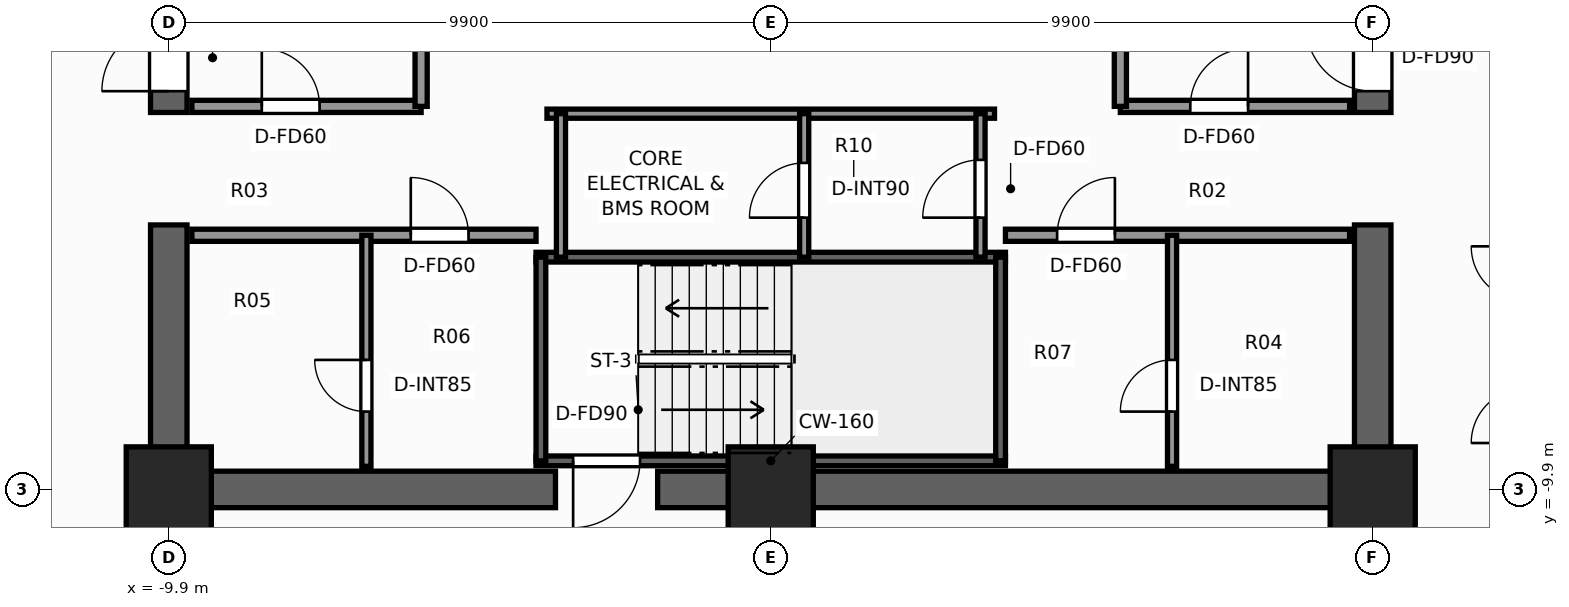
"""IFC4 building model, lengths in metres.
Left out: names, types, materials, properties, quantities, classifications, styles, units other than length and angle.
Written with IfcOpenShell. Run it as: python <this file> out.ifc"""

import sys

from ifc_helpers import new_model, si_unit, direction, frame, frame_2d, origin, origin_2d, place, context, subcontext, project, spatial, rectangle, extrude, element, fill, save


model = new_model("IFC4")
c1 = context("Model", 3, precision=1e-05, world=origin(), true_north=direction((0.0, 1.0)))
c2 = subcontext(c1, "Body", "Model", "MODEL_VIEW")
j1 = project(units=[si_unit("LENGTHUNIT", "METRE"), si_unit("PLANEANGLEUNIT", "RADIAN")], contexts=[c1])
p1 = place(None, origin())
s1 = spatial("IfcSite", under=j1, at=p1, CompositionType="ELEMENT")
p2 = place(p1, origin())
s2 = spatial("IfcBuilding", under=s1, at=p2, CompositionType="ELEMENT")
p3 = place(p2, frame((0.0, 0.0, 33.7)))
s3 = spatial("IfcBuildingStorey", under=s2, at=p3, CompositionType="ELEMENT", Elevation=33.7)
p4 = place(p3, frame((10.2, -9.9, 0.0), z_axis=(0.0, 0.0, 1.0), x_axis=(-1.0, 0.0, 0.0)))
e1 = element("IfcWall", 1, at=p4, inside=s3, PredefinedType="SHEAR", context=c2, shape_type="SweptSolid", body=[
    extrude(rectangle(XDim=12.06, YDim=0.6, at=frame_2d((6.03, 0.0))), origin(), (0.0, 0.0, 1.0), 3.3),
])
p5 = place(p3, frame((-3.54, -9.9, 0.0), z_axis=(0.0, 0.0, 1.0), x_axis=(-1.0, 0.0, 0.0)))
e2 = element("IfcWall", 2, at=p5, inside=s3, PredefinedType="SHEAR", context=c2, shape_type="SweptSolid", body=[
    extrude(rectangle(XDim=6.66, YDim=0.6, at=frame_2d((3.33, 0.0))), origin(), (0.0, 0.0, 1.0), 3.3),
])
for number, where, z_axis, x_axis in (
    (3, (-9.9, -9.6, 0.0), (0.0, 0.0, 1.0), (0.0, 1.0, 0.0)),
    (4, (9.9, -9.6, 0.0), (0.0, 0.0, 1.0), (0.0, 1.0, 0.0)),
):
    element("IfcWall", number, at=place(p3, frame(where, z_axis=z_axis, x_axis=x_axis)), inside=s3, PredefinedType="SHEAR", context=c2, shape_type="SweptSolid", body=[
        extrude(rectangle(XDim=4.05, YDim=0.6, at=frame_2d((2.025, 0.0))), origin(), (0.0, 0.0, 1.0), 3.3),
    ])
p6 = place(p3, frame((-9.9, -3.7, 0.0), z_axis=(0.0, 0.0, 1.0), x_axis=(0.0, 1.0, 0.0)))
e5 = element("IfcWall", 5, at=p6, inside=s3, PredefinedType="SHEAR", context=c2, shape_type="SweptSolid", body=[
    extrude(rectangle(XDim=13.3, YDim=0.6, at=frame_2d((6.65, 0.0))), origin(), (0.0, 0.0, 1.0), 3.3),
])
p7 = place(p6, frame((0.35, 0.0, 0.0)))
e6 = element("IfcOpeningElement", 6, at=p7, cuts=e5, PredefinedType="OPENING", context=c2, shape_type="SweptSolid", body=[
    extrude(rectangle(XDim=1.1, YDim=2.2, at=frame_2d((0.55, 1.1))), frame((0.0, 0.31, 0.0), z_axis=(0.0, -1.0, 0.0), x_axis=(1.0, 0.0, 0.0)), (0.0, 0.0, 1.0), 0.62),
])
p8 = place(p3, frame((9.9, -3.7, 0.0), z_axis=(0.0, 0.0, 1.0), x_axis=(0.0, 1.0, 0.0)))
e7 = element("IfcWall", 7, at=p8, inside=s3, PredefinedType="SHEAR", context=c2, shape_type="SweptSolid", body=[
    extrude(rectangle(XDim=13.3, YDim=0.6, at=frame_2d((6.65, 0.0))), origin(), (0.0, 0.0, 1.0), 3.3),
])
p9 = place(p8, frame((0.35, 0.0, 0.0)))
e8 = element("IfcOpeningElement", 8, at=p9, cuts=e7, PredefinedType="OPENING", context=c2, shape_type="SweptSolid", body=[
    extrude(rectangle(XDim=1.1, YDim=2.2, at=frame_2d((0.55, 1.1))), frame((0.0, 0.31, 0.0), z_axis=(0.0, -1.0, 0.0), x_axis=(1.0, 0.0, 0.0)), (0.0, 0.0, 1.0), 0.62),
])
for number, where, z_axis, x_axis in (
    (9, (-9.9, -9.9, 0.0), (0.0, 0.0, 1.0), (1.0, 0.0, 0.0)),
    (10, (9.9, -9.9, 0.0), (0.0, 0.0, 1.0), (1.0, 0.0, 0.0)),
    (11, (0.0, -9.9, 0.0), (0.0, 0.0, 1.0), (1.0, 0.0, 0.0)),
):
    element("IfcColumn", number, at=place(p3, frame(where, z_axis=z_axis, x_axis=x_axis)), inside=s3, PredefinedType="COLUMN", context=c2, shape_type="SweptSolid", body=[
        extrude(rectangle(XDim=1.4, YDim=1.4, at=origin_2d()), origin(), (0.0, 0.0, 1.0), 3.3),
    ])
p10 = place(p3, frame((3.86, -9.43, 0.0), z_axis=(0.0, 0.0, 1.0), x_axis=(-1.0, 0.0, 0.0)))
e12 = element("IfcWall", 12, at=p10, inside=s3, PredefinedType="SHEAR", context=c2, shape_type="SweptSolid", body=[
    extrude(rectangle(XDim=7.72, YDim=0.16, at=frame_2d((3.86, 0.0))), origin(), (0.0, 0.0, 1.0), 3.3),
])
p11 = place(p10, frame((6.01, 0.0, 0.0)))
e13 = element("IfcOpeningElement", 13, at=p11, cuts=e12, PredefinedType="OPENING", context=c2, shape_type="SweptSolid", body=[
    extrude(rectangle(XDim=1.1, YDim=2.2, at=frame_2d((0.55, 1.1))), frame((0.0, 0.09, 0.0), z_axis=(0.0, -1.0, 0.0), x_axis=(1.0, 0.0, 0.0)), (0.0, 0.0, 1.0), 0.18),
])
p12 = place(p3, frame((-3.86, -6.08, 0.0), z_axis=(0.0, 0.0, 1.0), x_axis=(1.0, 0.0, 0.0)))
e14 = element("IfcWall", 14, at=p12, inside=s3, PredefinedType="SHEAR", context=c2, shape_type="SweptSolid", body=[
    extrude(rectangle(XDim=7.72, YDim=0.16, at=frame_2d((3.86, 0.0))), origin(), (0.0, 0.0, 1.0), 3.3),
])
for number, where, z_axis, x_axis in (
    (15, (-3.78, -9.43, 0.0), (0.0, 0.0, 1.0), (0.0, 1.0, 0.0)),
    (16, (3.78, -9.43, 0.0), (0.0, 0.0, 1.0), (0.0, 1.0, 0.0)),
):
    element("IfcWall", number, at=place(p3, frame(where, z_axis=z_axis, x_axis=x_axis)), inside=s3, PredefinedType="SHEAR", context=c2, shape_type="SweptSolid", body=[
        extrude(rectangle(XDim=3.35, YDim=0.16, at=frame_2d((1.675, 0.0))), origin(), (0.0, 0.0, 1.0), 3.3),
    ])
p13 = place(p3, frame((-9.52, -3.6, 0.0), z_axis=(0.0, 0.0, 1.0), x_axis=(1.0, 0.0, 0.0)))
e17 = element("IfcWall", 17, at=p13, inside=s3, PredefinedType="SOLIDWALL", context=c2, shape_type="SweptSolid", body=[
    extrude(rectangle(XDim=3.77, YDim=0.2, at=frame_2d((1.885, 0.0))), origin(), (0.0, 0.0, 1.0), 3.06),
])
p14 = place(p13, frame((1.15, 0.0, 0.0)))
e18 = element("IfcOpeningElement", 18, at=p14, cuts=e17, PredefinedType="OPENING", context=c2, shape_type="SweptSolid", body=[
    extrude(rectangle(XDim=0.95, YDim=2.06, at=frame_2d((0.475, 1.03))), frame((0.0, 0.11, 0.0), z_axis=(0.0, -1.0, 0.0), x_axis=(1.0, 0.0, 0.0)), (0.0, 0.0, 1.0), 0.22),
])
p15 = place(p3, frame((-5.75, -3.6, 0.0), z_axis=(0.0, 0.0, 1.0), x_axis=(0.0, 1.0, 0.0)))
e19 = element("IfcWall", 19, at=p15, inside=s3, PredefinedType="SOLIDWALL", context=c2, shape_type="SweptSolid", body=[
    extrude(rectangle(XDim=5.57, YDim=0.2, at=frame_2d((2.785, 0.0))), origin(), (0.0, 0.0, 1.0), 3.06),
])
p16 = place(p15, frame((2.75, 0.0, 0.0)))
e20 = element("IfcOpeningElement", 20, at=p16, cuts=e19, PredefinedType="OPENING", context=c2, shape_type="SweptSolid", body=[
    extrude(rectangle(XDim=1.1, YDim=2.2, at=frame_2d((0.55, 1.1))), frame((0.0, 0.11, 0.0), z_axis=(0.0, -1.0, 0.0), x_axis=(1.0, 0.0, 0.0)), (0.0, 0.0, 1.0), 0.22),
])
p17 = place(p3, frame((5.75, -3.6, 0.0), z_axis=(0.0, 0.0, 1.0), x_axis=(1.0, 0.0, 0.0)))
e21 = element("IfcWall", 21, at=p17, inside=s3, PredefinedType="SOLIDWALL", context=c2, shape_type="SweptSolid", body=[
    extrude(rectangle(XDim=3.77, YDim=0.2, at=frame_2d((1.885, 0.0))), origin(), (0.0, 0.0, 1.0), 3.06),
])
p18 = place(p17, frame((1.15, 0.0, 0.0)))
e22 = element("IfcOpeningElement", 22, at=p18, cuts=e21, PredefinedType="OPENING", context=c2, shape_type="SweptSolid", body=[
    extrude(rectangle(XDim=0.95, YDim=2.06, at=frame_2d((0.475, 1.03))), frame((0.0, 0.11, 0.0), z_axis=(0.0, -1.0, 0.0), x_axis=(1.0, 0.0, 0.0)), (0.0, 0.0, 1.0), 0.22),
])
p19 = place(p3, frame((5.75, -3.6, 0.0), z_axis=(0.0, 0.0, 1.0), x_axis=(0.0, 1.0, 0.0)))
e23 = element("IfcWall", 23, at=p19, inside=s3, PredefinedType="SOLIDWALL", context=c2, shape_type="SweptSolid", body=[
    extrude(rectangle(XDim=5.57, YDim=0.2, at=frame_2d((2.785, 0.0))), origin(), (0.0, 0.0, 1.0), 3.06),
])
p20 = place(p19, frame((2.75, 0.0, 0.0)))
e24 = element("IfcOpeningElement", 24, at=p20, cuts=e23, PredefinedType="OPENING", context=c2, shape_type="SweptSolid", body=[
    extrude(rectangle(XDim=1.1, YDim=2.2, at=frame_2d((0.55, 1.1))), frame((0.0, 0.11, 0.0), z_axis=(0.0, -1.0, 0.0), x_axis=(1.0, 0.0, 0.0)), (0.0, 0.0, 1.0), 0.22),
])
p21 = place(p3, frame((-9.52, -5.72, 0.0), z_axis=(0.0, 0.0, 1.0), x_axis=(1.0, 0.0, 0.0)))
e25 = element("IfcWall", 25, at=p21, inside=s3, PredefinedType="SOLIDWALL", context=c2, shape_type="SweptSolid", body=[
    extrude(rectangle(XDim=5.66, YDim=0.2, at=frame_2d((2.83, 0.0))), origin(), (0.0, 0.0, 1.0), 3.06),
])
p22 = place(p21, frame((3.6, 0.0, 0.0)))
e26 = element("IfcOpeningElement", 26, at=p22, cuts=e25, PredefinedType="OPENING", context=c2, shape_type="SweptSolid", body=[
    extrude(rectangle(XDim=0.95, YDim=2.06, at=frame_2d((0.475, 1.03))), frame((0.0, 0.11, 0.0), z_axis=(0.0, -1.0, 0.0), x_axis=(1.0, 0.0, 0.0)), (0.0, 0.0, 1.0), 0.22),
])
p23 = place(p3, frame((-6.65, -9.52, 0.0), z_axis=(0.0, 0.0, 1.0), x_axis=(0.0, 1.0, 0.0)))
e27 = element("IfcWall", 27, at=p23, inside=s3, PredefinedType="PARTITIONING", context=c2, shape_type="SweptSolid", body=[
    extrude(rectangle(XDim=3.8, YDim=0.15, at=frame_2d((1.9, 0.0))), origin(), (0.0, 0.0, 1.0), 3.06),
])
p24 = place(p23, frame((0.9, 0.0, 0.0)))
e28 = element("IfcOpeningElement", 28, at=p24, cuts=e27, PredefinedType="OPENING", context=c2, shape_type="SweptSolid", body=[
    extrude(rectangle(XDim=0.85, YDim=2.03, at=frame_2d((0.425, 1.015))), frame((0.0, 0.085, 0.0), z_axis=(0.0, -1.0, 0.0), x_axis=(1.0, 0.0, 0.0)), (0.0, 0.0, 1.0), 0.17),
])
p25 = place(p3, frame((3.86, -5.72, 0.0), z_axis=(0.0, 0.0, 1.0), x_axis=(1.0, 0.0, 0.0)))
e29 = element("IfcWall", 29, at=p25, inside=s3, PredefinedType="SOLIDWALL", context=c2, shape_type="SweptSolid", body=[
    extrude(rectangle(XDim=5.66, YDim=0.2, at=frame_2d((2.83, 0.0))), origin(), (0.0, 0.0, 1.0), 3.06),
])
p26 = place(p25, frame((0.85, 0.0, 0.0)))
e30 = element("IfcOpeningElement", 30, at=p26, cuts=e29, PredefinedType="OPENING", context=c2, shape_type="SweptSolid", body=[
    extrude(rectangle(XDim=0.95, YDim=2.06, at=frame_2d((0.475, 1.03))), frame((0.0, 0.11, 0.0), z_axis=(0.0, -1.0, 0.0), x_axis=(1.0, 0.0, 0.0)), (0.0, 0.0, 1.0), 0.22),
])
p27 = place(p3, frame((6.6, -9.52, 0.0), z_axis=(0.0, 0.0, 1.0), x_axis=(0.0, 1.0, 0.0)))
e31 = element("IfcWall", 31, at=p27, inside=s3, PredefinedType="PARTITIONING", context=c2, shape_type="SweptSolid", body=[
    extrude(rectangle(XDim=3.8, YDim=0.15, at=frame_2d((1.9, 0.0))), origin(), (0.0, 0.0, 1.0), 3.06),
])
p28 = place(p27, frame((0.9, 0.0, 0.0)))
e32 = element("IfcOpeningElement", 32, at=p28, cuts=e31, PredefinedType="OPENING", context=c2, shape_type="SweptSolid", body=[
    extrude(rectangle(XDim=0.85, YDim=2.03, at=frame_2d((0.425, 1.015))), frame((0.0, 0.085, 0.0), z_axis=(0.0, -1.0, 0.0), x_axis=(1.0, 0.0, 0.0)), (0.0, 0.0, 1.0), 0.17),
])
p29 = place(p3, frame((-3.68, -3.72, 0.0), z_axis=(0.0, 0.0, 1.0), x_axis=(1.0, 0.0, 0.0)))
e33 = element("IfcWall", 33, at=p29, inside=s3, PredefinedType="PARTITIONING", context=c2, shape_type="SweptSolid", body=[
    extrude(rectangle(XDim=7.36, YDim=0.15, at=frame_2d((3.68, 0.0))), origin(), (0.0, 0.0, 1.0), 3.06),
])
p30 = place(p3, frame((3.45, -6.08, 0.0), z_axis=(0.0, 0.0, 1.0), x_axis=(0.0, 1.0, 0.0)))
e34 = element("IfcWall", 34, at=p30, inside=s3, PredefinedType="PARTITIONING", context=c2, shape_type="SweptSolid", body=[
    extrude(rectangle(XDim=2.36, YDim=0.15, at=frame_2d((1.18, 0.0))), origin(), (0.0, 0.0, 1.0), 3.06),
])
p31 = place(p30, frame((0.65, 0.0, 0.0)))
e35 = element("IfcOpeningElement", 35, at=p31, cuts=e34, PredefinedType="OPENING", context=c2, shape_type="SweptSolid", body=[
    extrude(rectangle(XDim=0.95, YDim=2.06, at=frame_2d((0.475, 1.03))), frame((0.0, 0.085, 0.0), z_axis=(0.0, -1.0, 0.0), x_axis=(1.0, 0.0, 0.0)), (0.0, 0.0, 1.0), 0.17),
])
p32 = place(p3, frame((-3.45, -6.08, 0.0), z_axis=(0.0, 0.0, 1.0), x_axis=(0.0, 1.0, 0.0)))
e36 = element("IfcWall", 36, at=p32, inside=s3, PredefinedType="PARTITIONING", context=c2, shape_type="SweptSolid", body=[
    extrude(rectangle(XDim=2.36, YDim=0.15, at=frame_2d((1.18, 0.0))), origin(), (0.0, 0.0, 1.0), 3.06),
])
p33 = place(p3, frame((0.55, -6.08, 0.0), z_axis=(0.0, 0.0, 1.0), x_axis=(0.0, 1.0, 0.0)))
e37 = element("IfcWall", 37, at=p33, inside=s3, PredefinedType="PARTITIONING", context=c2, shape_type="SweptSolid", body=[
    extrude(rectangle(XDim=2.36, YDim=0.15, at=frame_2d((1.18, 0.0))), origin(), (0.0, 0.0, 1.0), 3.06),
])
p34 = place(p33, frame((0.65, 0.0, 0.0)))
e38 = element("IfcOpeningElement", 38, at=p34, cuts=e37, PredefinedType="OPENING", context=c2, shape_type="SweptSolid", body=[
    extrude(rectangle(XDim=0.9, YDim=2.06, at=frame_2d((0.45, 1.03))), frame((0.0, 0.085, 0.0), z_axis=(0.0, -1.0, 0.0), x_axis=(1.0, 0.0, 0.0)), (0.0, 0.0, 1.0), 0.17),
])
p35 = place(p11, origin())
e39 = element("IfcDoor", 39, at=p35, inside=s3, OperationType="SINGLE_SWING_RIGHT", PredefinedType="DOOR", context=c2, shape_type="SweptSolid", body=[
    extrude(rectangle(XDim=1.1, YDim=2.2, at=frame_2d((0.55, 1.1))), frame((0.0, 0.025, 0.0), z_axis=(0.0, -1.0, 0.0), x_axis=(1.0, 0.0, 0.0)), (0.0, 0.0, 1.0), 0.05),
])
fill(e13, e39)
p36 = place(p7, origin())
e40 = element("IfcDoor", 40, at=p36, inside=s3, OperationType="SINGLE_SWING_LEFT", PredefinedType="DOOR", context=c2, shape_type="SweptSolid", body=[
    extrude(rectangle(XDim=1.1, YDim=2.2, at=frame_2d((0.55, 1.1))), frame((0.0, 0.025, 0.0), z_axis=(0.0, -1.0, 0.0), x_axis=(1.0, 0.0, 0.0)), (0.0, 0.0, 1.0), 0.05),
])
fill(e6, e40)
p37 = place(p9, origin())
e41 = element("IfcDoor", 41, at=p37, inside=s3, OperationType="SINGLE_SWING_RIGHT", PredefinedType="DOOR", context=c2, shape_type="SweptSolid", body=[
    extrude(rectangle(XDim=1.1, YDim=2.2, at=frame_2d((0.55, 1.1))), frame((0.0, 0.025, 0.0), z_axis=(0.0, -1.0, 0.0), x_axis=(1.0, 0.0, 0.0)), (0.0, 0.0, 1.0), 0.05),
])
fill(e8, e41)
p38 = place(p22, origin())
e42 = element("IfcDoor", 42, at=p38, inside=s3, OperationType="SINGLE_SWING_LEFT", PredefinedType="DOOR", context=c2, shape_type="SweptSolid", body=[
    extrude(rectangle(XDim=0.95, YDim=2.06, at=frame_2d((0.475, 1.03))), frame((0.0, 0.025, 0.0), z_axis=(0.0, -1.0, 0.0), x_axis=(1.0, 0.0, 0.0)), (0.0, 0.0, 1.0), 0.05),
])
fill(e26, e42)
p39 = place(p24, origin())
e43 = element("IfcDoor", 43, at=p39, inside=s3, OperationType="SINGLE_SWING_RIGHT", PredefinedType="DOOR", context=c2, shape_type="SweptSolid", body=[
    extrude(rectangle(XDim=0.85, YDim=2.03, at=frame_2d((0.425, 1.015))), frame((0.0, 0.025, 0.0), z_axis=(0.0, -1.0, 0.0), x_axis=(1.0, 0.0, 0.0)), (0.0, 0.0, 1.0), 0.05),
])
fill(e28, e43)
p40 = place(p14, origin())
e44 = element("IfcDoor", 44, at=p40, inside=s3, OperationType="SINGLE_SWING_LEFT", PredefinedType="DOOR", context=c2, shape_type="SweptSolid", body=[
    extrude(rectangle(XDim=0.95, YDim=2.06, at=frame_2d((0.475, 1.03))), frame((0.0, 0.025, 0.0), z_axis=(0.0, -1.0, 0.0), x_axis=(1.0, 0.0, 0.0)), (0.0, 0.0, 1.0), 0.05),
])
fill(e18, e44)
p41 = place(p26, origin())
e45 = element("IfcDoor", 45, at=p41, inside=s3, OperationType="SINGLE_SWING_RIGHT", PredefinedType="DOOR", context=c2, shape_type="SweptSolid", body=[
    extrude(rectangle(XDim=0.95, YDim=2.06, at=frame_2d((0.475, 1.03))), frame((0.0, 0.025, 0.0), z_axis=(0.0, -1.0, 0.0), x_axis=(1.0, 0.0, 0.0)), (0.0, 0.0, 1.0), 0.05),
])
fill(e30, e45)
p42 = place(p28, origin())
e46 = element("IfcDoor", 46, at=p42, inside=s3, OperationType="SINGLE_SWING_LEFT", PredefinedType="DOOR", context=c2, shape_type="SweptSolid", body=[
    extrude(rectangle(XDim=0.85, YDim=2.03, at=frame_2d((0.425, 1.015))), frame((0.0, 0.025, 0.0), z_axis=(0.0, -1.0, 0.0), x_axis=(1.0, 0.0, 0.0)), (0.0, 0.0, 1.0), 0.05),
])
fill(e32, e46)
p43 = place(p18, origin())
e47 = element("IfcDoor", 47, at=p43, inside=s3, OperationType="SINGLE_SWING_RIGHT", PredefinedType="DOOR", context=c2, shape_type="SweptSolid", body=[
    extrude(rectangle(XDim=0.95, YDim=2.06, at=frame_2d((0.475, 1.03))), frame((0.0, 0.025, 0.0), z_axis=(0.0, -1.0, 0.0), x_axis=(1.0, 0.0, 0.0)), (0.0, 0.0, 1.0), 0.05),
])
fill(e22, e47)
p44 = place(p31, origin())
e48 = element("IfcDoor", 48, at=p44, inside=s3, OperationType="SINGLE_SWING_LEFT", PredefinedType="DOOR", context=c2, shape_type="SweptSolid", body=[
    extrude(rectangle(XDim=0.95, YDim=2.06, at=frame_2d((0.475, 1.03))), frame((0.0, 0.025, 0.0), z_axis=(0.0, -1.0, 0.0), x_axis=(1.0, 0.0, 0.0)), (0.0, 0.0, 1.0), 0.05),
])
fill(e35, e48)
p45 = place(p34, origin())
e49 = element("IfcDoor", 49, at=p45, inside=s3, OperationType="SINGLE_SWING_LEFT", PredefinedType="DOOR", context=c2, shape_type="SweptSolid", body=[
    extrude(rectangle(XDim=0.9, YDim=2.06, at=frame_2d((0.45, 1.03))), frame((0.0, 0.025, 0.0), z_axis=(0.0, -1.0, 0.0), x_axis=(1.0, 0.0, 0.0)), (0.0, 0.0, 1.0), 0.05),
])
fill(e38, e49)
save(model, sys.argv[1])
